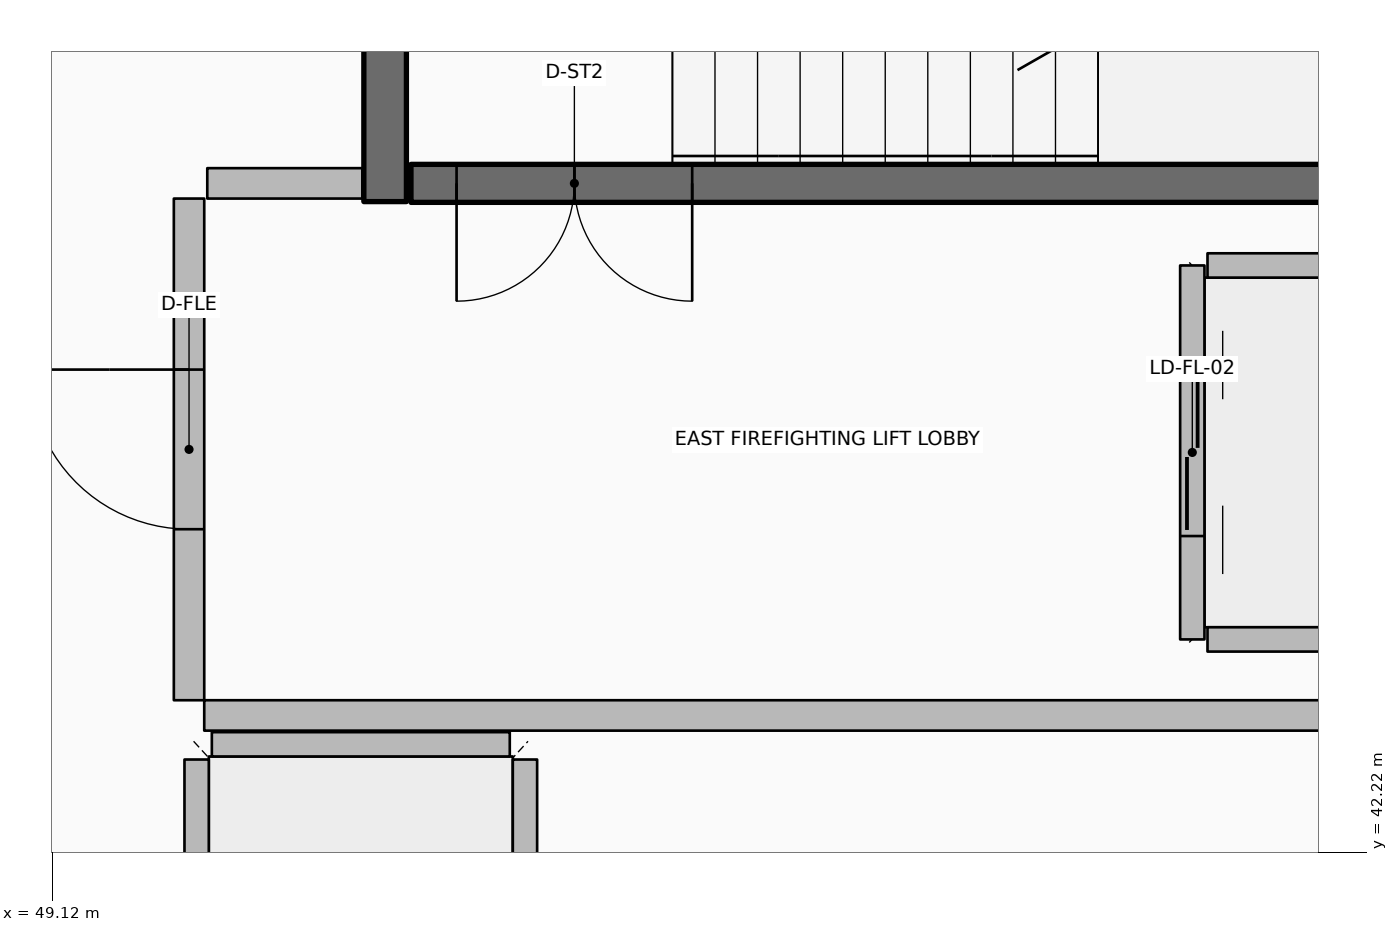
"""IFC4 building model, lengths in metres.
Left out: names, types, materials, properties, quantities, classifications, styles, units other than length and angle.
Written with IfcOpenShell. Run it as: python <this file> out.ifc"""

import sys

from ifc_helpers import new_model, si_unit, direction, frame, frame_2d, origin, origin_2d, place, context, subcontext, project, spatial, rectangle, hollow_rectangle, extrude, element, fill, save


model = new_model("IFC4")
c1 = context("Model", 3, precision=1e-05, world=origin(), true_north=direction((0.0, 1.0)))
c2 = subcontext(c1, "Body", "Model", "MODEL_VIEW")
j1 = project(units=[si_unit("LENGTHUNIT", "METRE"), si_unit("PLANEANGLEUNIT", "RADIAN")], contexts=[c1])
p1 = place(None, origin())
s1 = spatial("IfcSite", under=j1, at=p1, CompositionType="ELEMENT")
p2 = place(p1, origin())
s2 = spatial("IfcBuilding", under=s1, at=p2, CompositionType="ELEMENT")
p3 = place(p2, frame((0.0, 0.0, -7.6)))
s3 = spatial("IfcBuildingStorey", under=s2, at=p3, CompositionType="ELEMENT", Elevation=-7.6)
p4 = place(p3, frame((51.31, 46.5, 0.0), z_axis=(0.0, 0.0, 1.0), x_axis=(0.0, 1.0, 0.0)))
e1 = element("IfcWall", 1, at=p4, inside=s3, PredefinedType="SHEAR", context=c2, shape_type="SweptSolid", body=[
    extrude(rectangle(XDim=3.5, YDim=0.28, at=frame_2d((1.75, 0.0))), origin(), (0.0, 0.0, 1.0), 3.8),
])
p5 = place(p3, frame((56.0, 46.62, 0.0), z_axis=(0.0, 0.0, 1.0), x_axis=(1.0, 0.0, 0.0)))
e2 = element("IfcColumn", 2, at=p5, inside=s3, PredefinedType="COLUMN", context=c2, shape_type="SweptSolid", body=[
    extrude(hollow_rectangle(XDim=0.2, YDim=0.2, WallThickness=0.01, InnerFilletRadius=0.01, OuterFilletRadius=0.02, at=origin_2d()), origin(), (0.0, 0.0, 1.0), 1.695),
])
p6 = place(p3, frame((51.48, 46.62, 0.0), z_axis=(0.0, 0.0, 1.0), x_axis=(1.0, 0.0, 0.0)))
e3 = element("IfcWall", 3, at=p6, inside=s3, PredefinedType="SOLIDWALL", context=c2, shape_type="SweptSolid", body=[
    extrude(rectangle(XDim=7.54, YDim=0.25, at=frame_2d((3.77, 0.0))), origin(), (0.0, 0.0, 1.0), 3.52),
])
p7 = place(p6, frame((0.3, 0.0, 0.0)))
e4 = element("IfcOpeningElement", 4, at=p7, cuts=e3, PredefinedType="OPENING", context=c2, shape_type="SweptSolid", body=[
    extrude(rectangle(XDim=1.55, YDim=2.15, at=frame_2d((0.775, 1.075))), frame((0.0, 0.135, 0.0), z_axis=(0.0, -1.0, 0.0), x_axis=(1.0, 0.0, 0.0)), (0.0, 0.0, 1.0), 0.27),
])
p8 = place(p3, frame((56.62, 46.08, 0.0), z_axis=(0.0, 0.0, 1.0), x_axis=(0.0, -1.0, 0.0)))
e5 = element("IfcWall", 5, at=p8, inside=s3, PredefinedType="PARTITIONING", context=c2, shape_type="SweptSolid", body=[
    extrude(rectangle(XDim=2.46, YDim=0.16, at=frame_2d((1.23, 0.0))), origin(), (0.0, 0.0, 1.0), 3.52),
])
p9 = place(p8, frame((0.68, 0.0, 0.0)))
e6 = element("IfcOpeningElement", 6, at=p9, cuts=e5, PredefinedType="OPENING", context=c2, shape_type="SweptSolid", body=[
    extrude(rectangle(XDim=1.1, YDim=2.1, at=frame_2d((0.55, 1.05))), frame((0.0, 0.09, 0.0), z_axis=(0.0, -1.0, 0.0), x_axis=(1.0, 0.0, 0.0)), (0.0, 0.0, 1.0), 0.18),
])
for number, where, z_axis, x_axis in (
    (7, (56.72, 46.08, 0.0), (0.0, 0.0, 1.0), (1.0, 0.0, 0.0)),
    (8, (56.72, 43.62, 0.0), (0.0, 0.0, 1.0), (1.0, 0.0, 0.0)),
):
    element("IfcWall", number, at=place(p3, frame(where, z_axis=z_axis, x_axis=x_axis)), inside=s3, PredefinedType="PARTITIONING", context=c2, shape_type="SweptSolid", body=[
        extrude(rectangle(XDim=2.06, YDim=0.16, at=frame_2d((1.03, 0.0))), origin(), (0.0, 0.0, 1.0), 3.52),
    ])
for number, where, z_axis, x_axis in (
    (9, (52.23, 40.67, 0.0), (0.0, 0.0, 1.0), (0.0, 1.0, 0.0)),
    (10, (50.07, 40.67, 0.0), (0.0, 0.0, 1.0), (0.0, 1.0, 0.0)),
):
    element("IfcWall", number, at=place(p3, frame(where, z_axis=z_axis, x_axis=x_axis)), inside=s3, PredefinedType="PARTITIONING", context=c2, shape_type="SweptSolid", body=[
        extrude(rectangle(XDim=2.16, YDim=0.16, at=frame_2d((1.08, 0.0))), origin(), (0.0, 0.0, 1.0), 3.52),
    ])
p10 = place(p3, frame((50.17, 42.93, 0.0), z_axis=(0.0, 0.0, 1.0), x_axis=(1.0, 0.0, 0.0)))
e11 = element("IfcWall", 11, at=p10, inside=s3, PredefinedType="PARTITIONING", context=c2, shape_type="SweptSolid", body=[
    extrude(rectangle(XDim=1.96, YDim=0.16, at=frame_2d((0.98, 0.0))), origin(), (0.0, 0.0, 1.0), 3.52),
])
p11 = place(p3, frame((50.12, 43.12, 0.0), z_axis=(0.0, 0.0, 1.0), x_axis=(1.0, 0.0, 0.0)))
e12 = element("IfcWall", 12, at=p11, inside=s3, PredefinedType="PARTITIONING", context=c2, shape_type="SweptSolid", body=[
    extrude(rectangle(XDim=8.88, YDim=0.2, at=frame_2d((4.44, 0.0))), origin(), (0.0, 0.0, 1.0), 3.52),
])
p12 = place(p3, frame((50.14, 46.62, 0.0), z_axis=(0.0, 0.0, 1.0), x_axis=(1.0, 0.0, 0.0)))
e13 = element("IfcWall", 13, at=p12, inside=s3, PredefinedType="PARTITIONING", context=c2, shape_type="SweptSolid", body=[
    extrude(rectangle(XDim=1.02, YDim=0.2, at=frame_2d((0.51, 0.0))), origin(), (0.0, 0.0, 1.0), 3.52),
])
p13 = place(p3, frame((50.02, 43.22, 0.0), z_axis=(0.0, 0.0, 1.0), x_axis=(0.0, 1.0, 0.0)))
e14 = element("IfcWall", 14, at=p13, inside=s3, PredefinedType="PARTITIONING", context=c2, shape_type="SweptSolid", body=[
    extrude(rectangle(XDim=3.3, YDim=0.2, at=frame_2d((1.65, 0.0))), origin(), (0.0, 0.0, 1.0), 3.52),
])
p14 = place(p13, frame((1.125, 0.0, 0.0)))
e15 = element("IfcOpeningElement", 15, at=p14, cuts=e14, PredefinedType="OPENING", context=c2, shape_type="SweptSolid", body=[
    extrude(rectangle(XDim=1.05, YDim=2.1, at=frame_2d((0.525, 1.05))), frame((0.0, 0.11, 0.0), z_axis=(0.0, -1.0, 0.0), x_axis=(1.0, 0.0, 0.0)), (0.0, 0.0, 1.0), 0.22),
])
p15 = place(p7, origin())
e16 = element("IfcDoor", 16, at=p15, inside=s3, OperationType="DOUBLE_DOOR_SINGLE_SWING", PredefinedType="DOOR", context=c2, shape_type="SweptSolid", body=[
    extrude(rectangle(XDim=1.55, YDim=2.15, at=frame_2d((0.775, 1.075))), frame((0.0, 0.025, 0.0), z_axis=(0.0, -1.0, 0.0), x_axis=(1.0, 0.0, 0.0)), (0.0, 0.0, 1.0), 0.05),
])
fill(e4, e16)
p16 = place(p9, origin())
e17 = element("IfcDoor", 17, at=p16, inside=s3, OperationType="DOUBLE_DOOR_SLIDING", PredefinedType="DOOR", context=c2, shape_type="SweptSolid", body=[
    extrude(rectangle(XDim=1.1, YDim=2.1, at=frame_2d((0.55, 1.05))), frame((0.0, 0.025, 0.0), z_axis=(0.0, -1.0, 0.0), x_axis=(1.0, 0.0, 0.0)), (0.0, 0.0, 1.0), 0.05),
])
fill(e6, e17)
p17 = place(p14, origin())
e18 = element("IfcDoor", 18, at=p17, inside=s3, OperationType="SINGLE_SWING_RIGHT", PredefinedType="DOOR", context=c2, shape_type="SweptSolid", body=[
    extrude(rectangle(XDim=1.05, YDim=2.1, at=frame_2d((0.525, 1.05))), frame((0.0, 0.025, 0.0), z_axis=(0.0, -1.0, 0.0), x_axis=(1.0, 0.0, 0.0)), (0.0, 0.0, 1.0), 0.05),
])
fill(e15, e18)
save(model, sys.argv[1])
